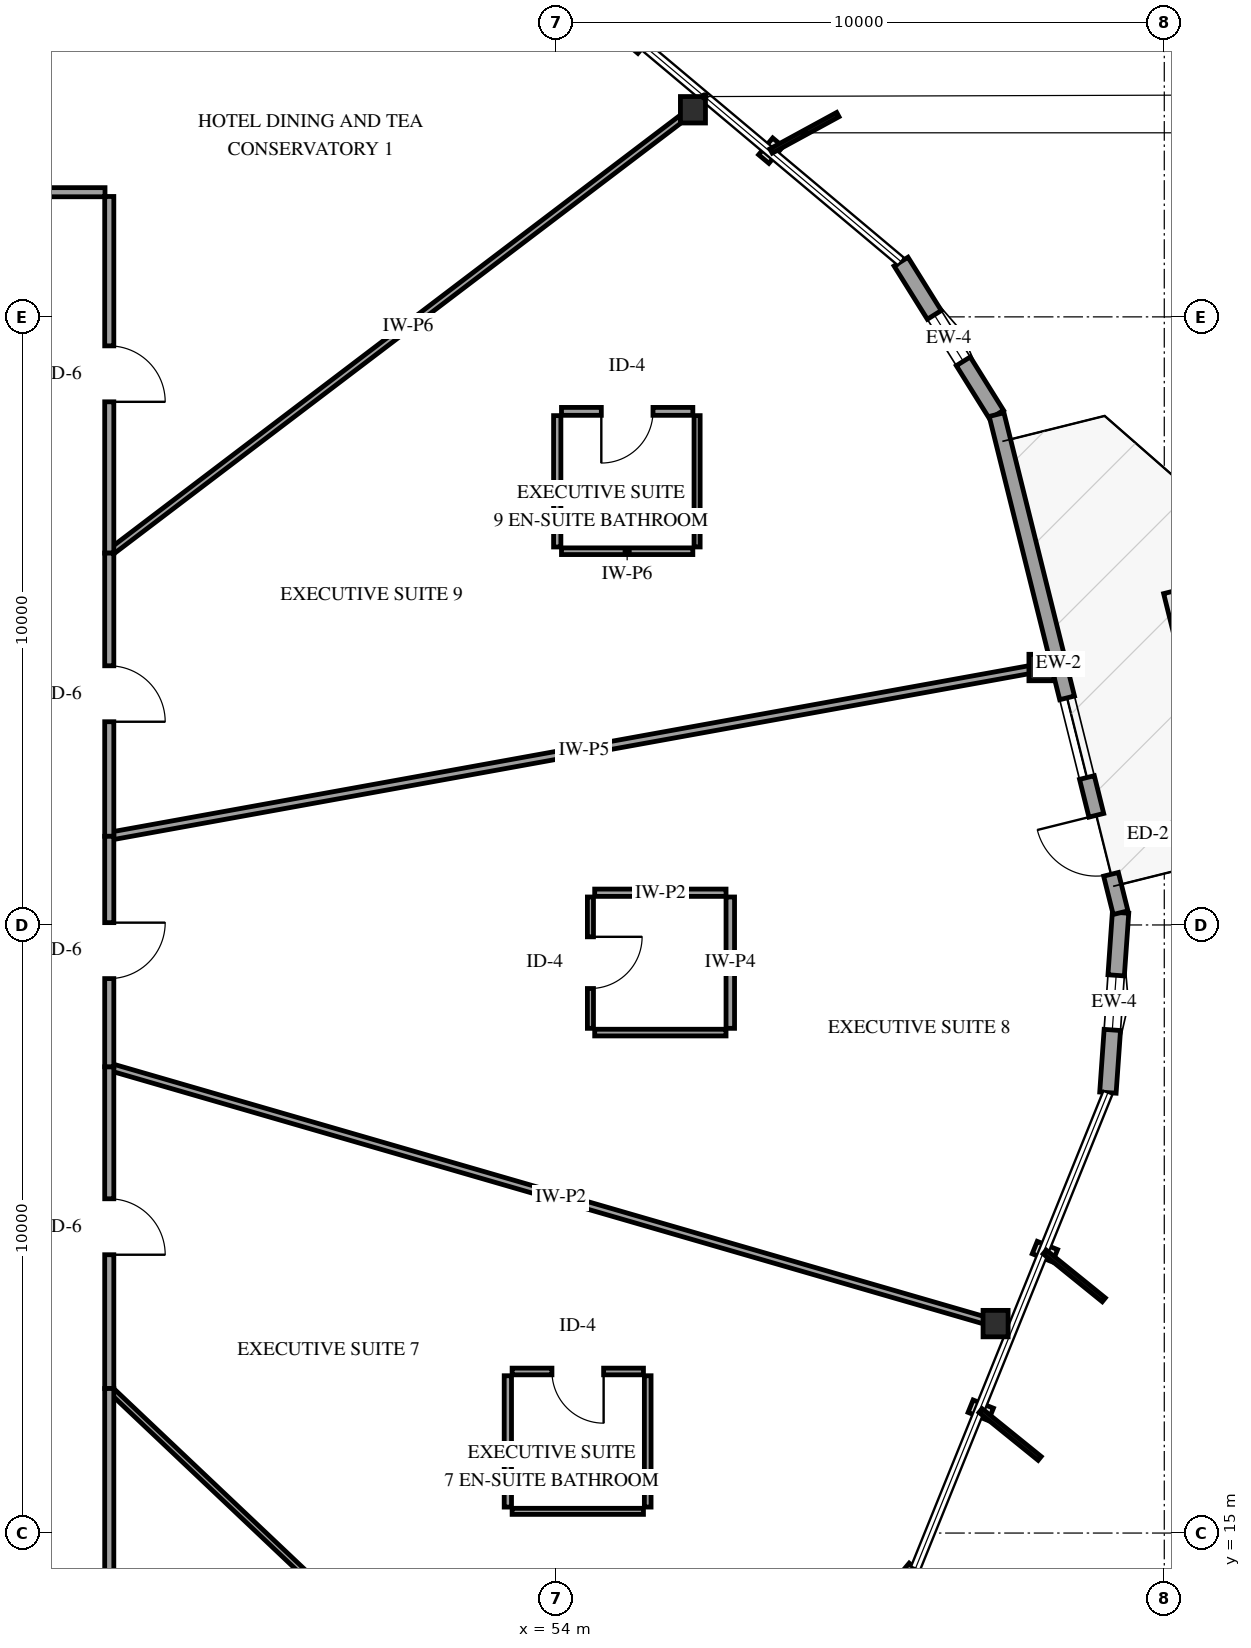
"""IFC4 building model, lengths in metres.
Left out: names, types, materials, properties, quantities, classifications, styles, units other than length and angle.
Written with IfcOpenShell. Run it as: python <this file> out.ifc"""

import sys

from ifc_helpers import new_model, si_unit, direction, frame, frame_2d, origin, origin_2d, place, context, subcontext, project, spatial, rectangle, i_section, extrude, element, fill, save


model = new_model("IFC4")
c1 = context("Model", 3, precision=1e-05, world=origin(), true_north=direction((0.0, 1.0)))
c2 = subcontext(c1, "Body", "Model", "MODEL_VIEW")
j1 = project(units=[si_unit("LENGTHUNIT", "METRE"), si_unit("PLANEANGLEUNIT", "RADIAN")], contexts=[c1])
p1 = place(None, origin())
s1 = spatial("IfcSite", under=j1, at=p1, CompositionType="ELEMENT")
p2 = place(p1, origin())
s2 = spatial("IfcBuilding", under=s1, at=p2, CompositionType="ELEMENT")
p3 = place(p2, frame((0.0, 0.0, 157.0)))
s3 = spatial("IfcBuildingStorey", under=s2, at=p3, CompositionType="ELEMENT", Elevation=157.0)
for number, where, z_axis, x_axis in (
    (1, (61.98, 29.234, 0.0), (0.0, 0.0, 1.0), (1.0, 0.0, 0.0)),
    (2, (56.249, 38.406, 0.0), (0.0, 0.0, 1.0), (1.0, 0.0, 0.0)),
    (3, (61.226, 18.444, 0.0), (0.0, 0.0, 1.0), (1.0, 0.0, 0.0)),
):
    element("IfcColumn", number, at=place(p3, frame(where, z_axis=z_axis, x_axis=x_axis)), inside=s3, PredefinedType="COLUMN", context=c2, shape_type="SweptSolid", body=[
        extrude(i_section(OverallWidth=0.412, OverallDepth=0.435, WebThickness=0.036, FlangeThickness=0.057, FilletRadius=0.038, at=origin_2d()), origin(), (0.0, 0.0, 1.0), 3.6),
    ])
p4 = place(p3, frame((58.001, 12.146, 0.0), z_axis=(0.0, 0.0, 1.0), x_axis=(0.643085925087, 0.765794027762, 0.0)))
e4 = element("IfcWall", 4, at=p4, inside=s3, PredefinedType="SOLIDWALL", context=c2, shape_type="SweptSolid", body=[
    extrude(rectangle(XDim=2.967, YDim=0.27, at=frame_2d((1.483, 0.0))), origin(), (0.0, 0.0, 1.0), 2.679),
])
p5 = place(p4, frame((1.033, 0.0, 0.75)))
e5 = element("IfcOpeningElement", 5, at=p5, cuts=e4, PredefinedType="OPENING", context=c2, shape_type="SweptSolid", body=[
    extrude(rectangle(XDim=0.9, YDim=1.5, at=frame_2d((0.45, 0.75))), frame((0.0, 0.145, 0.0), z_axis=(0.0, -1.0, 0.0), x_axis=(1.0, 0.0, 0.0)), (0.0, 0.0, 1.0), 0.29),
])
p6 = place(p3, frame((63.073, 22.243, 0.0), z_axis=(0.0, 0.0, 1.0), x_axis=(0.070118221482, 0.997538688481, 0.0)))
e6 = element("IfcWall", 6, at=p6, inside=s3, PredefinedType="SOLIDWALL", context=c2, shape_type="SweptSolid", body=[
    extrude(rectangle(XDim=2.967, YDim=0.27, at=frame_2d((1.483, 0.0))), origin(), (0.0, 0.0, 1.0), 2.679),
])
p7 = place(p6, frame((1.033, 0.0, 0.75)))
e7 = element("IfcOpeningElement", 7, at=p7, cuts=e6, PredefinedType="OPENING", context=c2, shape_type="SweptSolid", body=[
    extrude(rectangle(XDim=0.9, YDim=1.5, at=frame_2d((0.45, 0.75))), frame((0.0, 0.145, 0.0), z_axis=(0.0, -1.0, 0.0), x_axis=(1.0, 0.0, 0.0)), (0.0, 0.0, 1.0), 0.29),
])
p8 = place(p3, frame((61.242, 33.393, 0.0), z_axis=(0.0, 0.0, 1.0), x_axis=(-0.529592009117, 0.848252500073, 0.0)))
e8 = element("IfcWall", 8, at=p8, inside=s3, PredefinedType="SOLIDWALL", context=c2, shape_type="SweptSolid", body=[
    extrude(rectangle(XDim=2.967, YDim=0.27, at=frame_2d((1.483, 0.0))), origin(), (0.0, 0.0, 1.0), 2.679),
])
p9 = place(p8, frame((1.033, 0.0, 0.75)))
e9 = element("IfcOpeningElement", 9, at=p9, cuts=e8, PredefinedType="OPENING", context=c2, shape_type="SweptSolid", body=[
    extrude(rectangle(XDim=0.9, YDim=1.5, at=frame_2d((0.45, 0.75))), frame((0.0, 0.145, 0.0), z_axis=(0.0, -1.0, 0.0), x_axis=(1.0, 0.0, 0.0)), (0.0, 0.0, 1.0), 0.29),
])
p10 = place(p3, frame((63.281, 25.202, 0.0), z_axis=(0.0, 0.0, 1.0), x_axis=(-0.241582680268, 0.970380239182, 0.0)))
e10 = element("IfcWall", 10, at=p10, inside=s3, PredefinedType="SOLIDWALL", context=c2, shape_type="SweptSolid", body=[
    extrude(rectangle(XDim=8.44, YDim=0.25, at=frame_2d((4.22, 0.0))), origin(), (0.0, 0.0, 1.0), 2.679),
])
p11 = place(p10, frame((0.65, 0.0, 0.0)))
e11 = element("IfcOpeningElement", 11, at=p11, cuts=e10, PredefinedType="OPENING", context=c2, shape_type="SweptSolid", body=[
    extrude(rectangle(XDim=1.0, YDim=2.15, at=frame_2d((0.5, 1.075))), frame((0.0, 0.135, 0.0), z_axis=(0.0, -1.0, 0.0), x_axis=(1.0, 0.0, 0.0)), (0.0, 0.0, 1.0), 0.27),
])
p12 = place(p10, frame((2.29, 0.0, 0.72)))
e12 = element("IfcOpeningElement", 12, at=p12, cuts=e10, PredefinedType="OPENING", context=c2, shape_type="SweptSolid", body=[
    extrude(rectangle(XDim=1.35, YDim=1.65, at=frame_2d((0.675, 0.825))), frame((0.0, 0.135, 0.0), z_axis=(0.0, -1.0, 0.0), x_axis=(1.0, 0.0, 0.0)), (0.0, 0.0, 1.0), 0.27),
])
p13 = place(p3, frame((62.264, 29.286, 0.0), z_axis=(0.0, 0.0, 1.0), x_axis=(-0.98399202702, -0.178212487671, 0.0)))
e13 = element("IfcWall", 13, at=p13, inside=s3, PredefinedType="PARTITIONING", context=c2, shape_type="SweptSolid", body=[
    extrude(rectangle(XDim=15.868, YDim=0.13, at=frame_2d((7.934, 0.0))), origin(), (0.0, 0.0, 1.0), 2.595),
])
p14 = place(p3, frame((46.65, 22.668, 0.0), z_axis=(0.0, 0.0, 1.0), x_axis=(0.960493218243, -0.27830339148, 0.0)))
e14 = element("IfcWall", 14, at=p14, inside=s3, PredefinedType="PARTITIONING", context=c2, shape_type="SweptSolid", body=[
    extrude(rectangle(XDim=15.465, YDim=0.12, at=frame_2d((7.732, 0.0))), origin(), (0.0, 0.0, 1.0), 3.3),
])
p15 = place(p3, frame((46.65, 31.115, 0.0), z_axis=(0.0, 0.0, 1.0), x_axis=(0.796312645744, 0.60488525377, 0.0)))
e15 = element("IfcWall", 15, at=p15, inside=s3, PredefinedType="PARTITIONING", context=c2, shape_type="SweptSolid", body=[
    extrude(rectangle(XDim=12.349, YDim=0.11, at=frame_2d((6.175, 0.0))), origin(), (0.0, 0.0, 1.0), 3.3),
])
p16 = place(p3, frame((46.65, 17.377, 0.0), z_axis=(0.0, 0.0, 1.0), x_axis=(0.726165374711, -0.687520071395, 0.0)))
e16 = element("IfcWall", 16, at=p16, inside=s3, PredefinedType="PARTITIONING", context=c2, shape_type="SweptSolid", body=[
    extrude(rectangle(XDim=10.797, YDim=0.1, at=frame_2d((5.398, 0.0))), origin(), (0.0, 0.0, 1.0), 2.595),
])
p17 = place(p3, frame((46.65, 36.98, 0.0), z_axis=(0.0, 0.0, 1.0), x_axis=(0.0, -1.0, 0.0)))
e17 = element("IfcWall", 17, at=p17, inside=s3, PredefinedType="PARTITIONING", context=c2, shape_type="SweptSolid", body=[
    extrude(rectangle(XDim=5.865, YDim=0.15, at=frame_2d((2.933, 0.0))), origin(), (0.0, 0.0, 1.0), 3.3),
])
p18 = place(p17, frame((2.457, 0.0, 0.0)))
e18 = element("IfcOpeningElement", 18, at=p18, cuts=e17, PredefinedType="OPENING", context=c2, shape_type="SweptSolid", body=[
    extrude(rectangle(XDim=0.92, YDim=2.12, at=frame_2d((0.46, 1.06))), frame((0.0, 0.085, 0.0), z_axis=(0.0, -1.0, 0.0), x_axis=(1.0, 0.0, 0.0)), (0.0, 0.0, 1.0), 0.17),
])
p19 = place(p3, frame((46.65, 22.668, 0.0), z_axis=(0.0, 0.0, 1.0), x_axis=(0.0, -1.0, 0.0)))
e19 = element("IfcWall", 19, at=p19, inside=s3, PredefinedType="PARTITIONING", context=c2, shape_type="SweptSolid", body=[
    extrude(rectangle(XDim=5.291, YDim=0.15, at=frame_2d((2.646, 0.0))), origin(), (0.0, 0.0, 1.0), 3.3),
])
p20 = place(p19, frame((2.171, 0.0, 0.0)))
e20 = element("IfcOpeningElement", 20, at=p20, cuts=e19, PredefinedType="OPENING", context=c2, shape_type="SweptSolid", body=[
    extrude(rectangle(XDim=0.92, YDim=2.12, at=frame_2d((0.46, 1.06))), frame((0.0, 0.085, 0.0), z_axis=(0.0, -1.0, 0.0), x_axis=(1.0, 0.0, 0.0)), (0.0, 0.0, 1.0), 0.17),
])
p21 = place(p3, frame((46.65, 31.115, 0.0), z_axis=(0.0, 0.0, 1.0), x_axis=(0.0, -1.0, 0.0)))
e21 = element("IfcWall", 21, at=p21, inside=s3, PredefinedType="PARTITIONING", context=c2, shape_type="SweptSolid", body=[
    extrude(rectangle(XDim=4.657, YDim=0.15, at=frame_2d((2.329, 0.0))), origin(), (0.0, 0.0, 1.0), 3.3),
])
p22 = place(p21, frame((1.853, 0.0, 0.0)))
e22 = element("IfcOpeningElement", 22, at=p22, cuts=e21, PredefinedType="OPENING", context=c2, shape_type="SweptSolid", body=[
    extrude(rectangle(XDim=0.92, YDim=2.12, at=frame_2d((0.46, 1.06))), frame((0.0, 0.085, 0.0), z_axis=(0.0, -1.0, 0.0), x_axis=(1.0, 0.0, 0.0)), (0.0, 0.0, 1.0), 0.17),
])
p23 = place(p3, frame((46.65, 17.377, 0.0), z_axis=(0.0, 0.0, 1.0), x_axis=(0.0, -1.0, 0.0)))
e23 = element("IfcWall", 23, at=p23, inside=s3, PredefinedType="PARTITIONING", context=c2, shape_type="SweptSolid", body=[
    extrude(rectangle(XDim=4.357, YDim=0.15, at=frame_2d((2.178, 0.0))), origin(), (0.0, 0.0, 1.0), 3.3),
])
p24 = place(p3, frame((46.65, 26.458, 0.0), z_axis=(0.0, 0.0, 1.0), x_axis=(0.0, -1.0, 0.0)))
e24 = element("IfcWall", 24, at=p24, inside=s3, PredefinedType="PARTITIONING", context=c2, shape_type="SweptSolid", body=[
    extrude(rectangle(XDim=3.79, YDim=0.15, at=frame_2d((1.895, 0.0))), origin(), (0.0, 0.0, 1.0), 3.3),
])
p25 = place(p24, frame((1.42, 0.0, 0.0)))
e25 = element("IfcOpeningElement", 25, at=p25, cuts=e24, PredefinedType="OPENING", context=c2, shape_type="SweptSolid", body=[
    extrude(rectangle(XDim=0.92, YDim=2.12, at=frame_2d((0.46, 1.06))), frame((0.0, 0.085, 0.0), z_axis=(0.0, -1.0, 0.0), x_axis=(1.0, 0.0, 0.0)), (0.0, 0.0, 1.0), 0.17),
])
p26 = place(p3, frame((43.27, 37.05, 0.0), z_axis=(0.0, 0.0, 1.0), x_axis=(1.0, 0.0, 0.0)))
e26 = element("IfcWall", 26, at=p26, inside=s3, PredefinedType="PARTITIONING", context=c2, shape_type="SweptSolid", body=[
    extrude(rectangle(XDim=3.31, YDim=0.15, at=frame_2d((1.655, 0.0))), origin(), (0.0, 0.0, 1.0), 3.3),
])
p27 = place(p3, frame((55.435, 17.657, 0.0), z_axis=(0.0, 0.0, 1.0), x_axis=(-1.0, 0.0, 0.0)))
e27 = element("IfcWall", 27, at=p27, inside=s3, PredefinedType="PARTITIONING", context=c2, shape_type="SweptSolid", body=[
    extrude(rectangle(XDim=2.16, YDim=0.11, at=frame_2d((1.08, 0.0))), origin(), (0.0, 0.0, 1.0), 3.3),
])
p28 = place(p27, frame((0.655, 0.0, 0.0)))
e28 = element("IfcOpeningElement", 28, at=p28, cuts=e27, PredefinedType="OPENING", context=c2, shape_type="SweptSolid", body=[
    extrude(rectangle(XDim=0.85, YDim=2.1, at=frame_2d((0.425, 1.05))), frame((0.0, 0.065, 0.0), z_axis=(0.0, -1.0, 0.0), x_axis=(1.0, 0.0, 0.0)), (0.0, 0.0, 1.0), 0.13),
])
p29 = place(p3, frame((53.275, 15.357, 0.0), z_axis=(0.0, 0.0, 1.0), x_axis=(1.0, 0.0, 0.0)))
e29 = element("IfcWall", 29, at=p29, inside=s3, PredefinedType="PARTITIONING", context=c2, shape_type="SweptSolid", body=[
    extrude(rectangle(XDim=2.16, YDim=0.1, at=frame_2d((1.08, 0.0))), origin(), (0.0, 0.0, 1.0), 3.3),
])
p30 = place(p3, frame((53.205, 17.587, 0.0), z_axis=(0.0, 0.0, 1.0), x_axis=(0.0, -1.0, 0.0)))
e30 = element("IfcWall", 30, at=p30, inside=s3, PredefinedType="PARTITIONING", context=c2, shape_type="SweptSolid", body=[
    extrude(rectangle(XDim=2.16, YDim=0.12, at=frame_2d((1.08, 0.0))), origin(), (0.0, 0.0, 1.0), 3.3),
])
p31 = place(p3, frame((55.505, 15.427, 0.0), z_axis=(0.0, 0.0, 1.0), x_axis=(0.0, 1.0, 0.0)))
e31 = element("IfcWall", 31, at=p31, inside=s3, PredefinedType="PARTITIONING", context=c2, shape_type="SweptSolid", body=[
    extrude(rectangle(XDim=2.16, YDim=0.11, at=frame_2d((1.08, 0.0))), origin(), (0.0, 0.0, 1.0), 3.3),
])
p32 = place(p3, frame((54.563, 25.46, 0.0), z_axis=(0.0, 0.0, 1.0), x_axis=(0.0, -1.0, 0.0)))
e32 = element("IfcWall", 32, at=p32, inside=s3, PredefinedType="PARTITIONING", context=c2, shape_type="SweptSolid", body=[
    extrude(rectangle(XDim=2.16, YDim=0.1, at=frame_2d((1.08, 0.0))), origin(), (0.0, 0.0, 1.0), 3.3),
])
p33 = place(p32, frame((0.655, 0.0, 0.0)))
e33 = element("IfcOpeningElement", 33, at=p33, cuts=e32, PredefinedType="OPENING", context=c2, shape_type="SweptSolid", body=[
    extrude(rectangle(XDim=0.85, YDim=2.1, at=frame_2d((0.425, 1.05))), frame((0.0, 0.06, 0.0), z_axis=(0.0, -1.0, 0.0), x_axis=(1.0, 0.0, 0.0)), (0.0, 0.0, 1.0), 0.12),
])
p34 = place(p3, frame((56.863, 23.3, 0.0), z_axis=(0.0, 0.0, 1.0), x_axis=(0.0, 1.0, 0.0)))
e34 = element("IfcWall", 34, at=p34, inside=s3, PredefinedType="PARTITIONING", context=c2, shape_type="SweptSolid", body=[
    extrude(rectangle(XDim=2.16, YDim=0.14, at=frame_2d((1.08, 0.0))), origin(), (0.0, 0.0, 1.0), 3.3),
])
p35 = place(p3, frame((56.247, 33.446, 0.0), z_axis=(0.0, 0.0, 1.0), x_axis=(-1.0, 0.0, 0.0)))
e35 = element("IfcWall", 35, at=p35, inside=s3, PredefinedType="PARTITIONING", context=c2, shape_type="SweptSolid", body=[
    extrude(rectangle(XDim=2.16, YDim=0.13, at=frame_2d((1.08, 0.0))), origin(), (0.0, 0.0, 1.0), 3.3),
])
p36 = place(p35, frame((0.655, 0.0, 0.0)))
e36 = element("IfcOpeningElement", 36, at=p36, cuts=e35, PredefinedType="OPENING", context=c2, shape_type="SweptSolid", body=[
    extrude(rectangle(XDim=0.85, YDim=2.1, at=frame_2d((0.425, 1.05))), frame((0.0, 0.075, 0.0), z_axis=(0.0, -1.0, 0.0), x_axis=(1.0, 0.0, 0.0)), (0.0, 0.0, 1.0), 0.15),
])
p37 = place(p3, frame((54.017, 33.376, 0.0), z_axis=(0.0, 0.0, 1.0), x_axis=(0.0, -1.0, 0.0)))
e37 = element("IfcWall", 37, at=p37, inside=s3, PredefinedType="PARTITIONING", context=c2, shape_type="SweptSolid", body=[
    extrude(rectangle(XDim=2.16, YDim=0.12, at=frame_2d((1.08, 0.0))), origin(), (0.0, 0.0, 1.0), 3.3),
])
p38 = place(p3, frame((54.087, 31.146, 0.0), z_axis=(0.0, 0.0, 1.0), x_axis=(1.0, 0.0, 0.0)))
e38 = element("IfcWall", 38, at=p38, inside=s3, PredefinedType="PARTITIONING", context=c2, shape_type="SweptSolid", body=[
    extrude(rectangle(XDim=2.16, YDim=0.11, at=frame_2d((1.08, 0.0))), origin(), (0.0, 0.0, 1.0), 3.3),
])
p39 = place(p3, frame((56.317, 31.216, 0.0), z_axis=(0.0, 0.0, 1.0), x_axis=(0.0, 1.0, 0.0)))
e39 = element("IfcWall", 39, at=p39, inside=s3, PredefinedType="PARTITIONING", context=c2, shape_type="SweptSolid", body=[
    extrude(rectangle(XDim=2.16, YDim=0.1, at=frame_2d((1.08, 0.0))), origin(), (0.0, 0.0, 1.0), 3.3),
])
p40 = place(p3, frame((56.793, 25.53, 0.0), z_axis=(0.0, 0.0, 1.0), x_axis=(-1.0, 0.0, 0.0)))
e40 = element("IfcWall", 40, at=p40, inside=s3, PredefinedType="PARTITIONING", context=c2, shape_type="SweptSolid", body=[
    extrude(rectangle(XDim=2.16, YDim=0.12, at=frame_2d((1.08, 0.0))), origin(), (0.0, 0.0, 1.0), 3.3),
])
p41 = place(p3, frame((54.633, 23.23, 0.0), z_axis=(0.0, 0.0, 1.0), x_axis=(1.0, 0.0, 0.0)))
e41 = element("IfcWall", 41, at=p41, inside=s3, PredefinedType="PARTITIONING", context=c2, shape_type="SweptSolid", body=[
    extrude(rectangle(XDim=2.16, YDim=0.11, at=frame_2d((1.08, 0.0))), origin(), (0.0, 0.0, 1.0), 3.3),
])
p42 = place(p7, origin())
e42 = element("IfcWindow", 42, at=p42, inside=s3, PartitioningType="SINGLE_PANEL", PredefinedType="WINDOW", context=c2, shape_type="SweptSolid", body=[
    extrude(rectangle(XDim=0.9, YDim=1.5, at=frame_2d((0.45, 0.75))), frame((0.0, 0.03, 0.0), z_axis=(0.0, -1.0, 0.0), x_axis=(1.0, 0.0, 0.0)), (0.0, 0.0, 1.0), 0.06),
])
fill(e7, e42)
p43 = place(p9, origin())
e43 = element("IfcWindow", 43, at=p43, inside=s3, PartitioningType="SINGLE_PANEL", PredefinedType="WINDOW", context=c2, shape_type="SweptSolid", body=[
    extrude(rectangle(XDim=0.9, YDim=1.5, at=frame_2d((0.45, 0.75))), frame((0.0, 0.03, 0.0), z_axis=(0.0, -1.0, 0.0), x_axis=(1.0, 0.0, 0.0)), (0.0, 0.0, 1.0), 0.06),
])
fill(e9, e43)
p44 = place(p11, origin())
e44 = element("IfcDoor", 44, at=p44, inside=s3, OperationType="SINGLE_SWING_RIGHT", PredefinedType="DOOR", context=c2, shape_type="SweptSolid", body=[
    extrude(rectangle(XDim=1.0, YDim=2.15, at=frame_2d((0.5, 1.075))), frame((0.0, 0.025, 0.0), z_axis=(0.0, -1.0, 0.0), x_axis=(1.0, 0.0, 0.0)), (0.0, 0.0, 1.0), 0.05),
])
fill(e11, e44)
p45 = place(p12, origin())
e45 = element("IfcWindow", 45, at=p45, inside=s3, PartitioningType="SINGLE_PANEL", PredefinedType="WINDOW", context=c2, shape_type="SweptSolid", body=[
    extrude(rectangle(XDim=1.35, YDim=1.65, at=frame_2d((0.675, 0.825))), frame((0.0, 0.03, 0.0), z_axis=(0.0, -1.0, 0.0), x_axis=(1.0, 0.0, 0.0)), (0.0, 0.0, 1.0), 0.06),
])
fill(e12, e45)
p46 = place(p18, origin())
e46 = element("IfcDoor", 46, at=p46, inside=s3, OperationType="SINGLE_SWING_RIGHT", PredefinedType="DOOR", context=c2, shape_type="SweptSolid", body=[
    extrude(rectangle(XDim=0.92, YDim=2.12, at=frame_2d((0.46, 1.06))), frame((0.0, 0.025, 0.0), z_axis=(0.0, -1.0, 0.0), x_axis=(1.0, 0.0, 0.0)), (0.0, 0.0, 1.0), 0.05),
])
fill(e18, e46)
p47 = place(p20, origin())
e47 = element("IfcDoor", 47, at=p47, inside=s3, OperationType="SINGLE_SWING_RIGHT", PredefinedType="DOOR", context=c2, shape_type="SweptSolid", body=[
    extrude(rectangle(XDim=0.92, YDim=2.12, at=frame_2d((0.46, 1.06))), frame((0.0, 0.025, 0.0), z_axis=(0.0, -1.0, 0.0), x_axis=(1.0, 0.0, 0.0)), (0.0, 0.0, 1.0), 0.05),
])
fill(e20, e47)
p48 = place(p22, origin())
e48 = element("IfcDoor", 48, at=p48, inside=s3, OperationType="SINGLE_SWING_RIGHT", PredefinedType="DOOR", context=c2, shape_type="SweptSolid", body=[
    extrude(rectangle(XDim=0.92, YDim=2.12, at=frame_2d((0.46, 1.06))), frame((0.0, 0.025, 0.0), z_axis=(0.0, -1.0, 0.0), x_axis=(1.0, 0.0, 0.0)), (0.0, 0.0, 1.0), 0.05),
])
fill(e22, e48)
p49 = place(p25, origin())
e49 = element("IfcDoor", 49, at=p49, inside=s3, OperationType="SINGLE_SWING_LEFT", PredefinedType="DOOR", context=c2, shape_type="SweptSolid", body=[
    extrude(rectangle(XDim=0.92, YDim=2.12, at=frame_2d((0.46, 1.06))), frame((0.0, 0.025, 0.0), z_axis=(0.0, -1.0, 0.0), x_axis=(1.0, 0.0, 0.0)), (0.0, 0.0, 1.0), 0.05),
])
fill(e25, e49)
p50 = place(p28, origin())
e50 = element("IfcDoor", 50, at=p50, inside=s3, OperationType="SINGLE_SWING_LEFT", PredefinedType="DOOR", context=c2, shape_type="SweptSolid", body=[
    extrude(rectangle(XDim=0.85, YDim=2.1, at=frame_2d((0.425, 1.05))), frame((0.0, 0.025, 0.0), z_axis=(0.0, -1.0, 0.0), x_axis=(1.0, 0.0, 0.0)), (0.0, 0.0, 1.0), 0.05),
])
fill(e28, e50)
p51 = place(p33, origin())
e51 = element("IfcDoor", 51, at=p51, inside=s3, OperationType="SINGLE_SWING_LEFT", PredefinedType="DOOR", context=c2, shape_type="SweptSolid", body=[
    extrude(rectangle(XDim=0.85, YDim=2.1, at=frame_2d((0.425, 1.05))), frame((0.0, 0.025, 0.0), z_axis=(0.0, -1.0, 0.0), x_axis=(1.0, 0.0, 0.0)), (0.0, 0.0, 1.0), 0.05),
])
fill(e33, e51)
p52 = place(p36, origin())
e52 = element("IfcDoor", 52, at=p52, inside=s3, OperationType="SINGLE_SWING_RIGHT", PredefinedType="DOOR", context=c2, shape_type="SweptSolid", body=[
    extrude(rectangle(XDim=0.85, YDim=2.1, at=frame_2d((0.425, 1.05))), frame((0.0, 0.025, 0.0), z_axis=(0.0, -1.0, 0.0), x_axis=(1.0, 0.0, 0.0)), (0.0, 0.0, 1.0), 0.05),
])
fill(e36, e52)
save(model, sys.argv[1])
